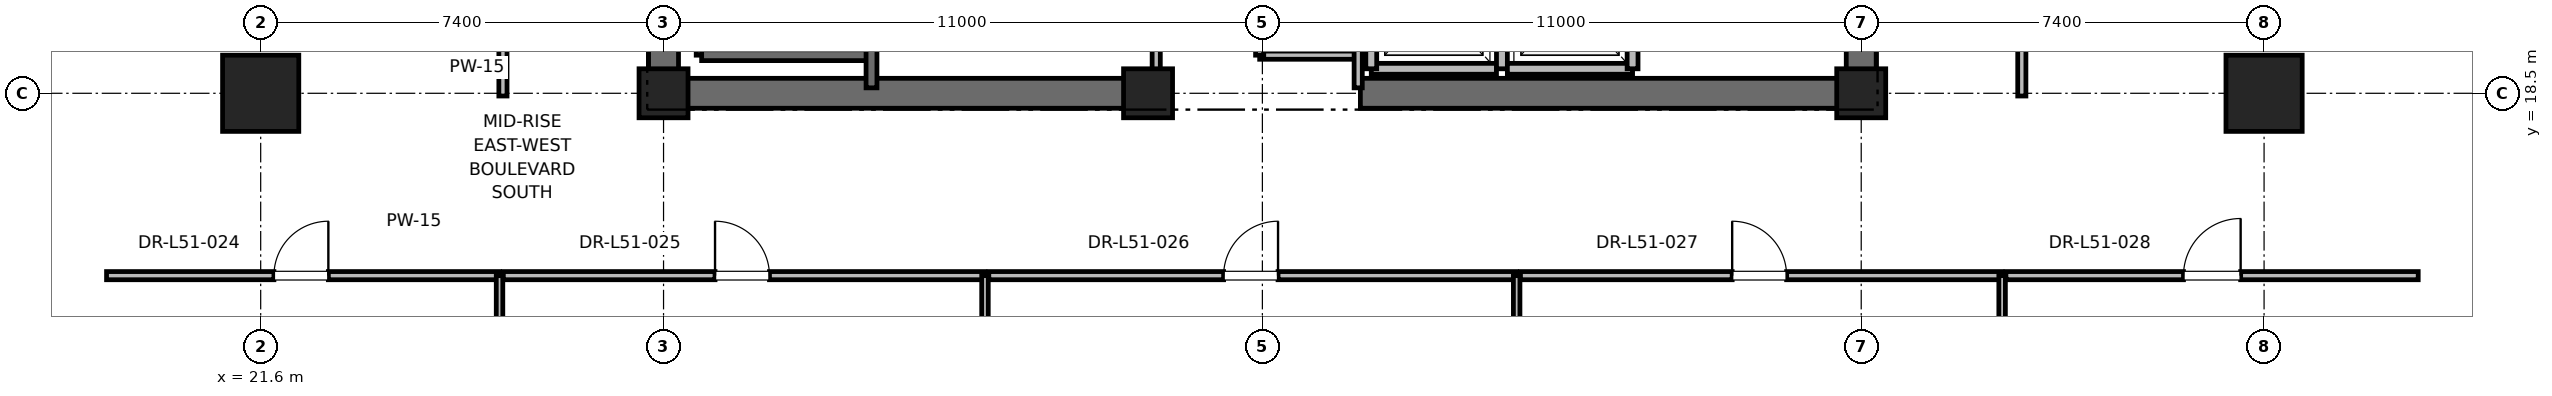
"""IFC4 building model, lengths in metres.
Left out: names, types, materials, properties, quantities, classifications, styles, units other than length and angle.
Written with IfcOpenShell. Run it as: python <this file> out.ifc"""

import sys

from ifc_helpers import new_model, si_unit, direction, frame, frame_2d, origin, origin_2d, place, context, subcontext, project, spatial, rectangle, extrude, element, fill, save


model = new_model("IFC4")
c1 = context("Model", 3, precision=1e-05, world=origin(), true_north=direction((0.0, 1.0)))
c2 = subcontext(c1, "Body", "Model", "MODEL_VIEW")
j1 = project(units=[si_unit("LENGTHUNIT", "METRE"), si_unit("PLANEANGLEUNIT", "RADIAN")], contexts=[c1])
p1 = place(None, origin())
s1 = spatial("IfcSite", under=j1, at=p1, CompositionType="ELEMENT")
p2 = place(p1, origin())
s2 = spatial("IfcBuilding", under=s1, at=p2, CompositionType="ELEMENT")
p3 = place(p2, frame((0.0, 0.0, 221.2)))
s3 = spatial("IfcBuildingStorey", under=s2, at=p3, CompositionType="ELEMENT", Elevation=221.2)
for number, where, z_axis, x_axis in (
    (1, (21.6, 18.5, 0.0), (0.0, 0.0, 1.0), (1.0, 0.0, 0.0)),
    (2, (58.4, 18.5, 0.0), (0.0, 0.0, 1.0), (1.0, 0.0, 0.0)),
):
    element("IfcColumn", number, at=place(p3, frame(where, z_axis=z_axis, x_axis=x_axis)), inside=s3, PredefinedType="COLUMN", context=c2, shape_type="SweptSolid", body=[
        extrude(rectangle(XDim=1.4, YDim=1.4, at=origin_2d()), origin(), (0.0, 0.0, 1.0), 4.0),
    ])
for number, where, z_axis, x_axis in (
    (3, (29.0, 18.5, 0.0), (0.0, 0.0, 1.0), (1.0, 0.0, 0.0)),
    (4, (51.0, 18.5, 0.0), (0.0, 0.0, 1.0), (1.0, 0.0, 0.0)),
    (5, (37.9, 18.5, 0.0), (0.0, 0.0, 1.0), (1.0, 0.0, 0.0)),
):
    element("IfcColumn", number, at=place(p3, frame(where, z_axis=z_axis, x_axis=x_axis)), inside=s3, PredefinedType="PILASTER", context=c2, shape_type="SweptSolid", body=[
        extrude(rectangle(XDim=0.9, YDim=0.9, at=origin_2d()), origin(), (0.0, 0.0, 1.0), 4.0),
    ])
for number, where, z_axis, x_axis in (
    (6, (29.0, 18.5, 0.0), (0.0, 0.0, 1.0), (1.0, 0.0, 0.0)),
    (7, (41.8, 18.5, 0.0), (0.0, 0.0, 1.0), (1.0, 0.0, 0.0)),
):
    element("IfcWall", number, at=place(p3, frame(where, z_axis=z_axis, x_axis=x_axis)), inside=s3, PredefinedType="SHEAR", context=c2, shape_type="SweptSolid", body=[
        extrude(rectangle(XDim=9.2, YDim=0.55, at=frame_2d((4.6, 0.0))), origin(), (0.0, 0.0, 1.0), 3.775),
    ])
p4 = place(p3, frame((29.0, 18.5, 0.0), z_axis=(0.0, 0.0, 1.0), x_axis=(0.0, 1.0, 0.0)))
e8 = element("IfcWall", 8, at=p4, inside=s3, PredefinedType="SHEAR", context=c2, shape_type="SweptSolid", body=[
    extrude(rectangle(XDim=8.8, YDim=0.55, at=frame_2d((4.4, 0.0))), origin(), (0.0, 0.0, 1.0), 3.775),
])
p5 = place(p3, frame((51.0, 18.5, 0.0), z_axis=(0.0, 0.0, 1.0), x_axis=(0.0, 1.0, 0.0)))
e9 = element("IfcWall", 9, at=p5, inside=s3, PredefinedType="SHEAR", context=c2, shape_type="SweptSolid", body=[
    extrude(rectangle(XDim=5.8, YDim=0.55, at=frame_2d((2.9, 0.0))), origin(), (0.0, 0.0, 1.0), 3.775),
])
p6 = place(p3, frame((29.7, 19.2, 0.0), z_axis=(0.0, 0.0, 1.0), x_axis=(0.0, 1.0, 0.0)))
e10 = element("IfcWall", 10, at=p6, inside=s3, PredefinedType="SOLIDWALL", context=c2, shape_type="SweptSolid", body=[
    extrude(rectangle(XDim=8.15, YDim=0.2, at=frame_2d((4.075, 0.0))), origin(), (0.0, 0.0, 1.0), 3.775),
])
p7 = place(p3, frame((29.7, 19.2, 0.0), z_axis=(0.0, 0.0, 1.0), x_axis=(1.0, 0.0, 0.0)))
e11 = element("IfcWall", 11, at=p7, inside=s3, PredefinedType="SOLIDWALL", context=c2, shape_type="SweptSolid", body=[
    extrude(rectangle(XDim=3.12, YDim=0.2, at=frame_2d((1.56, 0.0))), origin(), (0.0, 0.0, 1.0), 3.775),
])
p8 = place(p3, frame((32.82, 18.6, 0.0), z_axis=(0.0, 0.0, 1.0), x_axis=(0.0, 1.0, 0.0)))
e12 = element("IfcWall", 12, at=p8, inside=s3, PredefinedType="SOLIDWALL", context=c2, shape_type="SweptSolid", body=[
    extrude(rectangle(XDim=8.78, YDim=0.2, at=frame_2d((4.39, 0.0))), origin(), (0.0, 0.0, 1.0), 3.775),
])
p9 = place(p3, frame((42.0, 18.95, 0.0), z_axis=(0.0, 0.0, 1.0), x_axis=(1.0, 0.0, 0.0)))
e13 = element("IfcWall", 13, at=p9, inside=s3, PredefinedType="SOLIDWALL", context=c2, shape_type="SweptSolid", body=[
    extrude(rectangle(XDim=2.3, YDim=0.2, at=frame_2d((1.15, 0.0))), origin(), (0.0, 0.0, 1.0), 2.755),
])
p10 = place(p3, frame((42.0, 21.55, 0.0), z_axis=(0.0, 0.0, 1.0), x_axis=(0.0, -1.0, 0.0)))
e14 = element("IfcWall", 14, at=p10, inside=s3, PredefinedType="SOLIDWALL", context=c2, shape_type="SweptSolid", body=[
    extrude(rectangle(XDim=2.6, YDim=0.2, at=frame_2d((1.3, 0.0))), origin(), (0.0, 0.0, 1.0), 2.755),
])
p11 = place(p3, frame((44.4, 18.95, 0.0), z_axis=(0.0, 0.0, 1.0), x_axis=(0.0, 1.0, 0.0)))
e15 = element("IfcWall", 15, at=p11, inside=s3, PredefinedType="SOLIDWALL", context=c2, shape_type="SweptSolid", body=[
    extrude(rectangle(XDim=2.6, YDim=0.2, at=frame_2d((1.3, 0.0))), origin(), (0.0, 0.0, 1.0), 3.775),
])
p12 = place(p3, frame((44.5, 18.95, 0.0), z_axis=(0.0, 0.0, 1.0), x_axis=(1.0, 0.0, 0.0)))
e16 = element("IfcWall", 16, at=p12, inside=s3, PredefinedType="SOLIDWALL", context=c2, shape_type="SweptSolid", body=[
    extrude(rectangle(XDim=2.3, YDim=0.2, at=frame_2d((1.15, 0.0))), origin(), (0.0, 0.0, 1.0), 3.775),
])
p13 = place(p3, frame((46.8, 18.95, 0.0), z_axis=(0.0, 0.0, 1.0), x_axis=(0.0, 1.0, 0.0)))
e17 = element("IfcWall", 17, at=p13, inside=s3, PredefinedType="SOLIDWALL", context=c2, shape_type="SweptSolid", body=[
    extrude(rectangle(XDim=2.6, YDim=0.2, at=frame_2d((1.3, 0.0))), origin(), (0.0, 0.0, 1.0), 3.775),
])
p14 = place(p3, frame((39.95, 19.2, 0.0), z_axis=(0.0, 0.0, 1.0), x_axis=(1.0, 0.0, 0.0)))
e18 = element("IfcWall", 18, at=p14, inside=s3, PredefinedType="PARTITIONING", context=c2, shape_type="SweptSolid", body=[
    extrude(rectangle(XDim=1.81, YDim=0.15, at=frame_2d((0.905, 0.0))), origin(), (0.0, 0.0, 1.0), 2.85),
])
p15 = place(p3, frame((41.76, 18.6, 0.0), z_axis=(0.0, 0.0, 1.0), x_axis=(0.0, 1.0, 0.0)))
e19 = element("IfcWall", 19, at=p15, inside=s3, PredefinedType="PARTITIONING", context=c2, shape_type="SweptSolid", body=[
    extrude(rectangle(XDim=3.6, YDim=0.15, at=frame_2d((1.8, 0.0))), origin(), (0.0, 0.0, 1.0), 2.755),
])
p16 = place(p3, frame((39.95, 19.2, 0.0), z_axis=(0.0, 0.0, 1.0), x_axis=(0.0, 1.0, 0.0)))
e20 = element("IfcWall", 20, at=p16, inside=s3, PredefinedType="PARTITIONING", context=c2, shape_type="SweptSolid", body=[
    extrude(rectangle(XDim=3.0, YDim=0.15, at=frame_2d((1.5, 0.0))), origin(), (0.0, 0.0, 1.0), 2.85),
])
p17 = place(p16, frame((1.05, 0.0, 0.0)))
e21 = element("IfcOpeningElement", 21, at=p17, cuts=e20, PredefinedType="OPENING", context=c2, shape_type="SweptSolid", body=[
    extrude(rectangle(XDim=0.9, YDim=2.1, at=frame_2d((0.45, 1.05))), frame((0.0, 0.075, 0.0), z_axis=(0.0, -1.0, 0.0), x_axis=(1.0, 0.0, 0.0)), (0.0, 0.0, 1.0), 0.15),
])
p18 = place(p3, frame((38.05, 18.6, 0.0), z_axis=(0.0, 0.0, 1.0), x_axis=(0.0, 1.0, 0.0)))
e22 = element("IfcWall", 22, at=p18, inside=s3, PredefinedType="PARTITIONING", context=c2, shape_type="SweptSolid", body=[
    extrude(rectangle(XDim=3.06, YDim=0.15, at=frame_2d((1.53, 0.0))), origin(), (0.0, 0.0, 1.0), 2.755),
])
p19 = place(p18, frame((1.03, 0.0, 0.0)))
e23 = element("IfcOpeningElement", 23, at=p19, cuts=e22, PredefinedType="OPENING", context=c2, shape_type="SweptSolid", body=[
    extrude(rectangle(XDim=1.0, YDim=2.15, at=frame_2d((0.5, 1.075))), frame((0.0, 0.075, 0.0), z_axis=(0.0, -1.0, 0.0), x_axis=(1.0, 0.0, 0.0)), (0.0, 0.0, 1.0), 0.15),
])
p20 = place(p3, frame((18.769, 15.15, 0.0), z_axis=(0.0, 0.0, 1.0), x_axis=(1.0, 0.0, 0.0)))
e24 = element("IfcWall", 24, at=p20, inside=s3, PredefinedType="PARTITIONING", context=c2, shape_type="SweptSolid", body=[
    extrude(rectangle(XDim=7.219, YDim=0.15, at=frame_2d((3.609, 0.0))), origin(), (0.0, 0.0, 1.0), 2.85),
])
p21 = place(p20, frame((3.074, 0.0, 0.0)))
e25 = element("IfcOpeningElement", 25, at=p21, cuts=e24, PredefinedType="OPENING", context=c2, shape_type="SweptSolid", body=[
    extrude(rectangle(XDim=1.0, YDim=2.15, at=frame_2d((0.5, 1.075))), frame((0.0, 0.075, 0.0), z_axis=(0.0, -1.0, 0.0), x_axis=(1.0, 0.0, 0.0)), (0.0, 0.0, 1.0), 0.15),
])
p22 = place(p3, frame((25.987, 5.46, 0.0), z_axis=(0.0, 0.0, 1.0), x_axis=(0.0, 1.0, 0.0)))
e26 = element("IfcWall", 26, at=p22, inside=s3, PredefinedType="PARTITIONING", context=c2, shape_type="SweptSolid", body=[
    extrude(rectangle(XDim=9.69, YDim=0.12, at=frame_2d((4.845, 0.0))), origin(), (0.0, 0.0, 1.0), 2.85),
])
p23 = place(p3, frame((26.057, 15.15, 0.0), z_axis=(0.0, 0.0, 1.0), x_axis=(1.0, 0.0, 0.0)))
e27 = element("IfcWall", 27, at=p23, inside=s3, PredefinedType="PARTITIONING", context=c2, shape_type="SweptSolid", body=[
    extrude(rectangle(XDim=8.847, YDim=0.15, at=frame_2d((4.424, 0.0))), origin(), (0.0, 0.0, 1.0), 2.85),
])
p24 = place(p23, frame((3.889, 0.0, 0.0)))
e28 = element("IfcOpeningElement", 28, at=p24, cuts=e27, PredefinedType="OPENING", context=c2, shape_type="SweptSolid", body=[
    extrude(rectangle(XDim=1.0, YDim=2.15, at=frame_2d((0.5, 1.075))), frame((0.0, 0.075, 0.0), z_axis=(0.0, -1.0, 0.0), x_axis=(1.0, 0.0, 0.0)), (0.0, 0.0, 1.0), 0.15),
])
p25 = place(p3, frame((34.905, 5.46, 0.0), z_axis=(0.0, 0.0, 1.0), x_axis=(0.0, 1.0, 0.0)))
e29 = element("IfcWall", 29, at=p25, inside=s3, PredefinedType="PARTITIONING", context=c2, shape_type="SweptSolid", body=[
    extrude(rectangle(XDim=9.69, YDim=0.12, at=frame_2d((4.845, 0.0))), origin(), (0.0, 0.0, 1.0), 2.405),
])
p26 = place(p3, frame((34.975, 15.15, 0.0), z_axis=(0.0, 0.0, 1.0), x_axis=(1.0, 0.0, 0.0)))
e30 = element("IfcWall", 30, at=p26, inside=s3, PredefinedType="PARTITIONING", context=c2, shape_type="SweptSolid", body=[
    extrude(rectangle(XDim=9.696, YDim=0.15, at=frame_2d((4.848, 0.0))), origin(), (0.0, 0.0, 1.0), 2.85),
])
p27 = place(p26, frame((4.313, 0.0, 0.0)))
e31 = element("IfcOpeningElement", 31, at=p27, cuts=e30, PredefinedType="OPENING", context=c2, shape_type="SweptSolid", body=[
    extrude(rectangle(XDim=1.0, YDim=2.15, at=frame_2d((0.5, 1.075))), frame((0.0, 0.075, 0.0), z_axis=(0.0, -1.0, 0.0), x_axis=(1.0, 0.0, 0.0)), (0.0, 0.0, 1.0), 0.15),
])
p28 = place(p3, frame((44.671, 5.46, 0.0), z_axis=(0.0, 0.0, 1.0), x_axis=(0.0, 1.0, 0.0)))
e32 = element("IfcWall", 32, at=p28, inside=s3, PredefinedType="PARTITIONING", context=c2, shape_type="SweptSolid", body=[
    extrude(rectangle(XDim=9.69, YDim=0.12, at=frame_2d((4.845, 0.0))), origin(), (0.0, 0.0, 1.0), 2.405),
])
p29 = place(p3, frame((44.741, 15.15, 0.0), z_axis=(0.0, 0.0, 1.0), x_axis=(1.0, 0.0, 0.0)))
e33 = element("IfcWall", 33, at=p29, inside=s3, PredefinedType="PARTITIONING", context=c2, shape_type="SweptSolid", body=[
    extrude(rectangle(XDim=8.847, YDim=0.15, at=frame_2d((4.423, 0.0))), origin(), (0.0, 0.0, 1.0), 2.85),
])
p30 = place(p29, frame((3.889, 0.0, 0.0)))
e34 = element("IfcOpeningElement", 34, at=p30, cuts=e33, PredefinedType="OPENING", context=c2, shape_type="SweptSolid", body=[
    extrude(rectangle(XDim=1.0, YDim=2.15, at=frame_2d((0.5, 1.075))), frame((0.0, 0.075, 0.0), z_axis=(0.0, -1.0, 0.0), x_axis=(1.0, 0.0, 0.0)), (0.0, 0.0, 1.0), 0.15),
])
p31 = place(p3, frame((53.588, 5.46, 0.0), z_axis=(0.0, 0.0, 1.0), x_axis=(0.0, 1.0, 0.0)))
e35 = element("IfcWall", 35, at=p31, inside=s3, PredefinedType="PARTITIONING", context=c2, shape_type="SweptSolid", body=[
    extrude(rectangle(XDim=9.69, YDim=0.12, at=frame_2d((4.845, 0.0))), origin(), (0.0, 0.0, 1.0), 2.85),
])
p32 = place(p3, frame((53.658, 15.15, 0.0), z_axis=(0.0, 0.0, 1.0), x_axis=(1.0, 0.0, 0.0)))
e36 = element("IfcWall", 36, at=p32, inside=s3, PredefinedType="PARTITIONING", context=c2, shape_type="SweptSolid", body=[
    extrude(rectangle(XDim=7.573, YDim=0.15, at=frame_2d((3.787, 0.0))), origin(), (0.0, 0.0, 1.0), 2.85),
])
p33 = place(p32, frame((3.262, 0.0, 0.0)))
e37 = element("IfcOpeningElement", 37, at=p33, cuts=e36, PredefinedType="OPENING", context=c2, shape_type="SweptSolid", body=[
    extrude(rectangle(XDim=1.05, YDim=2.2, at=frame_2d((0.525, 1.1))), frame((0.0, 0.075, 0.0), z_axis=(0.0, -1.0, 0.0), x_axis=(1.0, 0.0, 0.0)), (0.0, 0.0, 1.0), 0.15),
])
p34 = place(p3, frame((26.05, 18.45, 0.0), z_axis=(0.0, 0.0, 1.0), x_axis=(0.0, 1.0, 0.0)))
e38 = element("IfcWall", 38, at=p34, inside=s3, PredefinedType="PARTITIONING", context=c2, shape_type="SweptSolid", body=[
    extrude(rectangle(XDim=5.611, YDim=0.15, at=frame_2d((2.806, 0.0))), origin(), (0.0, 0.0, 1.0), 2.85),
])
p35 = place(p34, frame((2.095, 0.0, 0.0)))
e39 = element("IfcOpeningElement", 39, at=p35, cuts=e38, PredefinedType="OPENING", context=c2, shape_type="SweptSolid", body=[
    extrude(rectangle(XDim=1.5, YDim=2.25, at=frame_2d((0.75, 1.125))), frame((0.0, 0.075, 0.0), z_axis=(0.0, -1.0, 0.0), x_axis=(1.0, 0.0, 0.0)), (0.0, 0.0, 1.0), 0.15),
])
p36 = place(p3, frame((53.95, 18.45, 0.0), z_axis=(0.0, 0.0, 1.0), x_axis=(0.0, 1.0, 0.0)))
e40 = element("IfcWall", 40, at=p36, inside=s3, PredefinedType="PARTITIONING", context=c2, shape_type="SweptSolid", body=[
    extrude(rectangle(XDim=6.516, YDim=0.15, at=frame_2d((3.258, 0.0))), origin(), (0.0, 0.0, 1.0), 2.85),
])
p37 = place(p36, frame((2.798, 0.0, 0.0)))
e41 = element("IfcOpeningElement", 41, at=p37, cuts=e40, PredefinedType="OPENING", context=c2, shape_type="SweptSolid", body=[
    extrude(rectangle(XDim=1.0, YDim=2.15, at=frame_2d((0.5, 1.075))), frame((0.0, 0.075, 0.0), z_axis=(0.0, -1.0, 0.0), x_axis=(1.0, 0.0, 0.0)), (0.0, 0.0, 1.0), 0.15),
])
p38 = place(p21, origin())
e42 = element("IfcDoor", 42, at=p38, inside=s3, OperationType="SINGLE_SWING_RIGHT", PredefinedType="DOOR", context=c2, shape_type="SweptSolid", body=[
    extrude(rectangle(XDim=1.0, YDim=2.15, at=frame_2d((0.5, 1.075))), frame((0.0, 0.025, 0.0), z_axis=(0.0, -1.0, 0.0), x_axis=(1.0, 0.0, 0.0)), (0.0, 0.0, 1.0), 0.05),
])
fill(e25, e42)
p39 = place(p24, origin())
e43 = element("IfcDoor", 43, at=p39, inside=s3, OperationType="SINGLE_SWING_LEFT", PredefinedType="DOOR", context=c2, shape_type="SweptSolid", body=[
    extrude(rectangle(XDim=1.0, YDim=2.15, at=frame_2d((0.5, 1.075))), frame((0.0, 0.025, 0.0), z_axis=(0.0, -1.0, 0.0), x_axis=(1.0, 0.0, 0.0)), (0.0, 0.0, 1.0), 0.05),
])
fill(e28, e43)
p40 = place(p27, origin())
e44 = element("IfcDoor", 44, at=p40, inside=s3, OperationType="SINGLE_SWING_RIGHT", PredefinedType="DOOR", context=c2, shape_type="SweptSolid", body=[
    extrude(rectangle(XDim=1.0, YDim=2.15, at=frame_2d((0.5, 1.075))), frame((0.0, 0.025, 0.0), z_axis=(0.0, -1.0, 0.0), x_axis=(1.0, 0.0, 0.0)), (0.0, 0.0, 1.0), 0.05),
])
fill(e31, e44)
p41 = place(p30, origin())
e45 = element("IfcDoor", 45, at=p41, inside=s3, OperationType="SINGLE_SWING_LEFT", PredefinedType="DOOR", context=c2, shape_type="SweptSolid", body=[
    extrude(rectangle(XDim=1.0, YDim=2.15, at=frame_2d((0.5, 1.075))), frame((0.0, 0.025, 0.0), z_axis=(0.0, -1.0, 0.0), x_axis=(1.0, 0.0, 0.0)), (0.0, 0.0, 1.0), 0.05),
])
fill(e34, e45)
p42 = place(p33, origin())
e46 = element("IfcDoor", 46, at=p42, inside=s3, OperationType="SINGLE_SWING_RIGHT", PredefinedType="DOOR", context=c2, shape_type="SweptSolid", body=[
    extrude(rectangle(XDim=1.05, YDim=2.2, at=frame_2d((0.525, 1.1))), frame((0.0, 0.025, 0.0), z_axis=(0.0, -1.0, 0.0), x_axis=(1.0, 0.0, 0.0)), (0.0, 0.0, 1.0), 0.05),
])
fill(e37, e46)
save(model, sys.argv[1])
